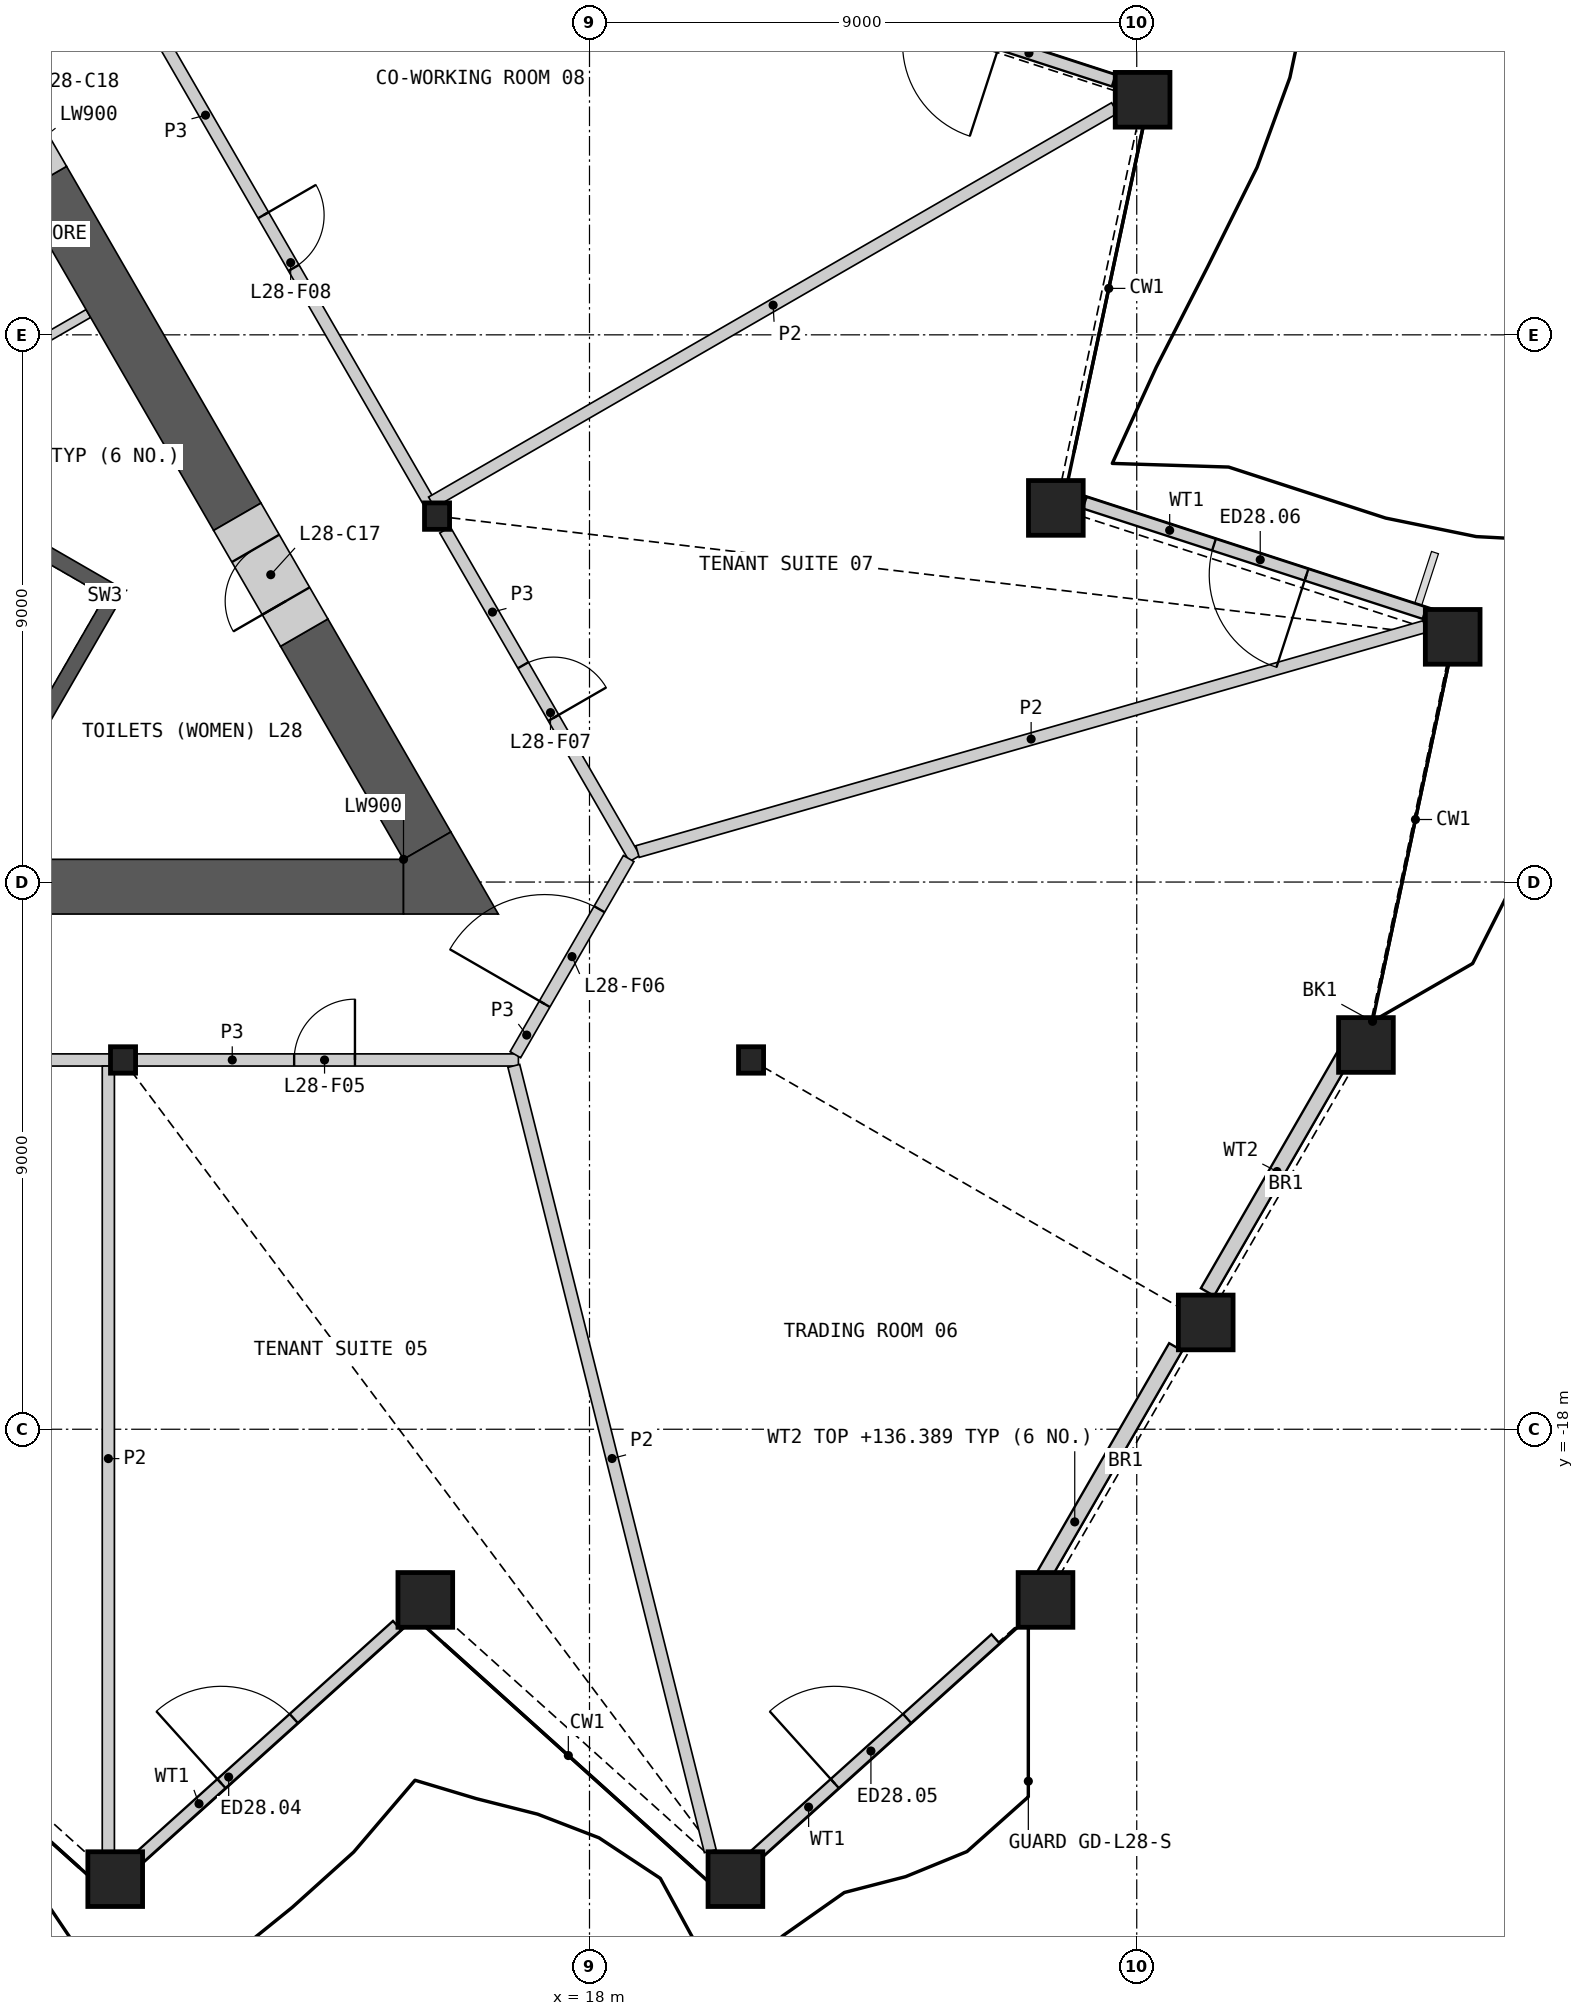
"""IFC4 building model, lengths in metres.
Left out: names, types, materials, properties, quantities, classifications, styles, units other than length and angle.
Written with IfcOpenShell. Run it as: python <this file> out.ifc"""

import sys

from ifc_helpers import new_model, si_unit, direction, frame, frame_2d, origin, origin_2d, place, context, subcontext, project, spatial, polyline, rectangle, hollow_rectangle, i_section, outline, extrude, element, fill, save


model = new_model("IFC4")
c1 = context("Model", 3, precision=1e-05, world=origin(), true_north=direction((0.0, 1.0)))
c2 = subcontext(c1, "Body", "Model", "MODEL_VIEW")
j1 = project(units=[si_unit("LENGTHUNIT", "METRE"), si_unit("PLANEANGLEUNIT", "RADIAN")], contexts=[c1])
p1 = place(None, origin())
s1 = spatial("IfcSite", under=j1, at=p1, CompositionType="ELEMENT")
p2 = place(p1, origin())
s2 = spatial("IfcBuilding", under=s1, at=p2, CompositionType="ELEMENT")
p3 = place(p2, frame((0.0, 0.0, 133.2)))
s3 = spatial("IfcBuildingStorey", under=s2, at=p3, CompositionType="ELEMENT", Elevation=133.2)
for number, where, z_axis, x_axis in (
    (1, (10.2, -25.399, 0.0), (0.0, 0.0, 1.0), (1.0, 0.0, 0.0)),
    (2, (15.3, -20.807, 0.0), (0.0, 0.0, 1.0), (1.0, 0.0, 0.0)),
    (3, (20.4, -25.399, 0.0), (0.0, 0.0, 1.0), (1.0, 0.0, 0.0)),
    (4, (25.5, -20.807, 0.0), (0.0, 0.0, 1.0), (1.0, 0.0, 0.0)),
    (5, (28.135, -16.243, 0.0), (0.0, 0.0, 1.0), (1.0, 0.0, 0.0)),
    (6, (30.769, -11.68, 0.0), (0.0, 0.0, 1.0), (1.0, 0.0, 0.0)),
    (7, (32.196, -4.967, 0.0), (0.0, 0.0, 1.0), (1.0, 0.0, 0.0)),
    (8, (25.669, -2.846, 0.0), (0.0, 0.0, 1.0), (1.0, 0.0, 0.0)),
    (9, (27.096, 3.866, 0.0), (0.0, 0.0, 1.0), (1.0, 0.0, 0.0)),
):
    element("IfcColumn", number, at=place(p3, frame(where, z_axis=z_axis, x_axis=x_axis)), inside=s3, PredefinedType="COLUMN", context=c2, shape_type="SweptSolid", body=[
        extrude(hollow_rectangle(XDim=0.9, YDim=0.9, WallThickness=0.06, at=origin_2d()), origin(), (0.0, 0.0, 1.0), 4.2),
    ])
for number, where, z_axis, x_axis in (
    (10, (10.328, -11.926, 0.0), (0.0, 0.0, 1.0), (1.0, 0.0, 0.0)),
    (11, (20.657, -11.926, 0.0), (0.0, 0.0, 1.0), (1.0, 0.0, 0.0)),
    (12, (15.493, -2.982, 0.0), (0.0, 0.0, 1.0), (1.0, 0.0, 0.0)),
):
    element("IfcColumn", number, at=place(p3, frame(where, z_axis=z_axis, x_axis=x_axis)), inside=s3, PredefinedType="COLUMN", context=c2, shape_type="SweptSolid", body=[
        extrude(i_section(OverallWidth=0.412, OverallDepth=0.435, WebThickness=0.036, FlangeThickness=0.057, at=origin_2d()), origin(), (0.0, 0.0, 1.0), 4.2),
    ])
p4 = place(p3, frame((10.492, -25.137, 0.0), z_axis=(0.0, 0.0, 1.0), x_axis=(0.743136230799, 0.669140151593, 0.0)))
e13 = element("IfcWall", 13, at=p4, inside=s3, PredefinedType="SOLIDWALL", context=c2, shape_type="SweptSolid", body=[
    extrude(rectangle(XDim=5.843, YDim=0.2, at=frame_2d((2.922, 0.0))), origin(), (0.0, 0.0, 1.0), 3.189),
])
p5 = place(p4, frame((1.957, 0.0, 0.0)))
e14 = element("IfcOpeningElement", 14, at=p5, cuts=e13, PredefinedType="OPENING", context=c2, shape_type="SweptSolid", body=[
    extrude(rectangle(XDim=1.6, YDim=2.4, at=frame_2d((0.8, 1.2))), frame((0.0, 0.11, 0.0), z_axis=(0.0, -1.0, 0.0), x_axis=(1.0, 0.0, 0.0)), (0.0, 0.0, 1.0), 0.22),
])
p6 = place(p3, frame((20.579, -25.137, 0.0), z_axis=(0.0, 0.0, 1.0), x_axis=(0.743148838472, 0.66912614945, 0.0)))
e15 = element("IfcWall", 15, at=p6, inside=s3, PredefinedType="SOLIDWALL", context=c2, shape_type="SweptSolid", body=[
    extrude(rectangle(XDim=5.515, YDim=0.2, at=frame_2d((2.757, 0.0))), origin(), (0.0, 0.0, 1.0), 3.189),
])
p7 = place(p6, frame((1.957, 0.0, 0.0)))
e16 = element("IfcOpeningElement", 16, at=p7, cuts=e15, PredefinedType="OPENING", context=c2, shape_type="SweptSolid", body=[
    extrude(rectangle(XDim=1.6, YDim=2.4, at=frame_2d((0.8, 1.2))), frame((0.0, 0.11, 0.0), z_axis=(0.0, -1.0, 0.0), x_axis=(1.0, 0.0, 0.0)), (0.0, 0.0, 1.0), 0.22),
])
p8 = place(p3, frame((25.427, -20.483, 0.0), z_axis=(0.0, 0.0, 1.0), x_axis=(0.499968989506, 0.866043306961, 0.0)))
e17 = element("IfcWall", 17, at=p8, inside=s3, PredefinedType="SOLIDWALL", context=c2, shape_type="SweptSolid", body=[
    extrude(rectangle(XDim=4.429, YDim=0.25, at=frame_2d((2.214, 0.0))), origin(), (0.0, 0.0, 1.0), 3.189),
])
p9 = place(p3, frame((28.163, -15.743, 0.0), z_axis=(0.0, 0.0, 1.0), x_axis=(0.500016357846, 0.866015959371, 0.0)))
e18 = element("IfcWall", 18, at=p9, inside=s3, PredefinedType="SOLIDWALL", context=c2, shape_type="SweptSolid", body=[
    extrude(rectangle(XDim=4.578, YDim=0.25, at=frame_2d((2.289, 0.0))), origin(), (0.0, 0.0, 1.0), 3.189),
])
p10 = place(p3, frame((31.734, -4.577, 0.0), z_axis=(0.0, 0.0, 1.0), x_axis=(-0.951060927669, 0.309003417231, 0.0)))
e19 = element("IfcWall", 19, at=p10, inside=s3, PredefinedType="SOLIDWALL", context=c2, shape_type="SweptSolid", body=[
    extrude(rectangle(XDim=5.877, YDim=0.2, at=frame_2d((2.939, 0.0))), origin(), (0.0, 0.0, 1.0), 3.189),
])
p11 = place(p10, frame((2.042, 0.0, 0.0)))
e20 = element("IfcOpeningElement", 20, at=p11, cuts=e19, PredefinedType="OPENING", context=c2, shape_type="SweptSolid", body=[
    extrude(rectangle(XDim=1.6, YDim=2.4, at=frame_2d((0.8, 1.2))), frame((0.0, 0.11, 0.0), z_axis=(0.0, -1.0, 0.0), x_axis=(1.0, 0.0, 0.0)), (0.0, 0.0, 1.0), 0.22),
])
p12 = place(p3, frame((26.622, 4.181, 0.0), z_axis=(0.0, 0.0, 1.0), x_axis=(-0.951053952554, 0.309024884649, 0.0)))
e21 = element("IfcWall", 21, at=p12, inside=s3, PredefinedType="SOLIDWALL", context=c2, shape_type="SweptSolid", body=[
    extrude(rectangle(XDim=5.865, YDim=0.2, at=frame_2d((2.932, 0.0))), origin(), (0.0, 0.0, 1.0), 3.189),
])
p13 = place(p12, frame((1.969, 0.0, 0.0)))
e22 = element("IfcOpeningElement", 22, at=p13, cuts=e21, PredefinedType="OPENING", context=c2, shape_type="SweptSolid", body=[
    extrude(rectangle(XDim=1.6, YDim=2.4, at=frame_2d((0.8, 1.2))), frame((0.0, 0.11, 0.0), z_axis=(0.0, -1.0, 0.0), x_axis=(1.0, 0.0, 0.0)), (0.0, 0.0, 1.0), 0.22),
])
p14 = place(p3, origin())
e23 = element("IfcWall", 23, at=p14, inside=s3, PredefinedType="SHEAR", context=c2, shape_type="SweptSolid", body=[
    extrude(outline(polyline([(8.83, -6.881), (10.374, -4.206), (10.032, -4.298), (8.738, -6.539), (8.83, -6.881)])), origin(), (0.0, 0.0, 1.0), 3.8),
])
p15 = place(p3, origin())
e24 = element("IfcWall", 24, at=p15, inside=s3, PredefinedType="SHEAR", context=c2, shape_type="SweptSolid", body=[
    extrude(outline(polyline([(10.032, -4.298), (10.374, -4.206), (5.307, -1.281), (5.182, -1.498), (10.032, -4.298)])), origin(), (0.0, 0.0, 1.0), 3.8),
])
p16 = place(p3, frame((8.268, -0.509, 0.0), z_axis=(0.0, 0.0, 1.0), x_axis=(0.866024871741, 0.500000921525, 0.0)))
e25 = element("IfcWall", 25, at=p16, inside=s3, PredefinedType="PARTITIONING", context=c2, shape_type="SweptSolid", body=[
    extrude(rectangle(XDim=1.72, YDim=0.15, at=frame_2d((0.86, 0.0))), origin(), (0.0, 0.0, 1.0), 3.8),
])
p17 = place(p3, frame((3.913, -9.076, 0.0), z_axis=(0.0, 0.0, 1.0), x_axis=(1.0, 0.0, 0.0)))
e26 = element("IfcWall", 26, at=p17, inside=s3, PredefinedType="SHEAR", context=c2, shape_type="SweptSolid", body=[
    extrude(rectangle(XDim=11.029, YDim=0.9, at=frame_2d((5.514, 0.0))), origin(), (0.0, 0.0, 1.0), 3.8),
])
p18 = place(p3, frame((12.208, -2.992, 0.0), z_axis=(0.0, 0.0, 1.0), x_axis=(-0.499990106751, 0.866031115579, 0.0)))
e27 = element("IfcWall", 27, at=p18, inside=s3, PredefinedType="SHEAR", context=c2, shape_type="SweptSolid", body=[
    extrude(rectangle(XDim=6.396, YDim=0.9, at=frame_2d((3.198, 0.0))), origin(), (0.0, 0.0, 1.0), 3.8),
])
p19 = place(p3, frame((15.331, -8.401, 0.0), z_axis=(0.0, 0.0, 1.0), x_axis=(-0.499974938593, 0.866039872511, 0.0)))
e28 = element("IfcWall", 28, at=p19, inside=s3, PredefinedType="SHEAR", context=c2, shape_type="SweptSolid", body=[
    extrude(rectangle(XDim=4.046, YDim=0.9, at=frame_2d((2.023, 0.0))), origin(), (0.0, 0.0, 1.0), 3.8),
])
p20 = place(p3, origin())
e29 = element("IfcWall", 29, at=p20, inside=s3, PredefinedType="SHEAR", context=c2, shape_type="SweptSolid", body=[
    extrude(outline(polyline([(14.941, -8.626), (15.721, -8.176), (16.5, -9.526), (14.941, -9.526), (14.941, -8.626)])), origin(), (0.0, 0.0, 1.0), 3.8),
])
p21 = place(p3, frame((13.308, -4.898, 0.0), z_axis=(0.0, 0.0, 1.0), x_axis=(-0.50002983664, 0.866008176907, 0.0)))
e30 = element("IfcWall", 30, at=p21, inside=s3, PredefinedType="SHEAR", context=c2, shape_type="SweptSolid", body=[
    extrude(rectangle(XDim=2.2, YDim=0.9, at=frame_2d((1.1, 0.0))), origin(), (0.0, 0.0, 1.0), 3.8),
])
p22 = place(p21, frame((0.6, 0.0, 0.0)))
e31 = element("IfcOpeningElement", 31, at=p22, cuts=e30, PredefinedType="OPENING", context=c2, shape_type="SweptSolid", body=[
    extrude(rectangle(XDim=1.0, YDim=2.1, at=frame_2d((0.5, 1.05))), frame((0.0, 0.46, 0.0), z_axis=(0.0, -1.0, 0.0), x_axis=(1.0, 0.0, 0.0)), (0.0, 0.0, 1.0), 0.92),
])
p23 = place(p3, frame((9.01, 2.546, 0.0), z_axis=(0.0, 0.0, 1.0), x_axis=(-0.499994660107, 0.866028486751, 0.0)))
e32 = element("IfcWall", 32, at=p23, inside=s3, PredefinedType="SHEAR", context=c2, shape_type="SweptSolid", body=[
    extrude(rectangle(XDim=2.2, YDim=0.9, at=frame_2d((1.1, 0.0))), origin(), (0.0, 0.0, 1.0), 3.8),
])
p24 = place(p23, frame((0.6, 0.0, 0.0)))
e33 = element("IfcOpeningElement", 33, at=p24, cuts=e32, PredefinedType="OPENING", context=c2, shape_type="SweptSolid", body=[
    extrude(rectangle(XDim=1.0, YDim=2.1, at=frame_2d((0.5, 1.05))), frame((0.0, 0.46, 0.0), z_axis=(0.0, -1.0, 0.0), x_axis=(1.0, 0.0, 0.0)), (0.0, 0.0, 1.0), 0.92),
])
p25 = place(p3, frame((0.227, -11.926, 0.0), z_axis=(0.0, 0.0, 1.0), x_axis=(1.0, 0.0, 0.0)))
e34 = element("IfcWall", 34, at=p25, inside=s3, PredefinedType="PARTITIONING", context=c2, shape_type="SweptSolid", body=[
    extrude(rectangle(XDim=9.969, YDim=0.2, at=frame_2d((4.985, 0.0))), origin(), (0.0, 0.0, 1.0), 3.8),
])
p26 = place(p25, frame((4.384, 0.0, 0.0)))
e35 = element("IfcOpeningElement", 35, at=p26, cuts=e34, PredefinedType="OPENING", context=c2, shape_type="SweptSolid", body=[
    extrude(rectangle(XDim=1.0, YDim=2.1, at=frame_2d((0.5, 1.05))), frame((0.0, 0.11, 0.0), z_axis=(0.0, -1.0, 0.0), x_axis=(1.0, 0.0, 0.0)), (0.0, 0.0, 1.0), 0.22),
])
p27 = place(p3, frame((10.46, 5.736, 0.0), z_axis=(0.0, 0.0, 1.0), x_axis=(0.500004141693, -0.866023012564, 0.0)))
e36 = element("IfcWall", 36, at=p27, inside=s3, PredefinedType="PARTITIONING", context=c2, shape_type="SweptSolid", body=[
    extrude(rectangle(XDim=9.803, YDim=0.2, at=frame_2d((4.902, 0.0))), origin(), (0.0, 0.0, 1.0), 3.8),
])
p28 = place(p27, frame((4.352, 0.0, 0.0)))
e37 = element("IfcOpeningElement", 37, at=p28, cuts=e36, PredefinedType="OPENING", context=c2, shape_type="SweptSolid", body=[
    extrude(rectangle(XDim=1.0, YDim=2.1, at=frame_2d((0.5, 1.05))), frame((0.0, 0.11, 0.0), z_axis=(0.0, -1.0, 0.0), x_axis=(1.0, 0.0, 0.0)), (0.0, 0.0, 1.0), 0.22),
])
p29 = place(p3, frame((10.556, -11.926, 0.0), z_axis=(0.0, 0.0, 1.0), x_axis=(1.0, 0.0, 0.0)))
e38 = element("IfcWall", 38, at=p29, inside=s3, PredefinedType="PARTITIONING", context=c2, shape_type="SweptSolid", body=[
    extrude(rectangle(XDim=6.275, YDim=0.2, at=frame_2d((3.137, 0.0))), origin(), (0.0, 0.0, 1.0), 3.8),
])
p30 = place(p29, frame((2.587, 0.0, 0.0)))
e39 = element("IfcOpeningElement", 39, at=p30, cuts=e38, PredefinedType="OPENING", context=c2, shape_type="SweptSolid", body=[
    extrude(rectangle(XDim=1.0, YDim=2.1, at=frame_2d((0.5, 1.05))), frame((0.0, 0.11, 0.0), z_axis=(0.0, -1.0, 0.0), x_axis=(1.0, 0.0, 0.0)), (0.0, 0.0, 1.0), 0.22),
])
p31 = place(p3, frame((15.624, -3.209, 0.0), z_axis=(0.0, 0.0, 1.0), x_axis=(0.499997920671, -0.866026604282, 0.0)))
e40 = element("IfcWall", 40, at=p31, inside=s3, PredefinedType="PARTITIONING", context=c2, shape_type="SweptSolid", body=[
    extrude(rectangle(XDim=6.24, YDim=0.2, at=frame_2d((3.12, 0.0))), origin(), (0.0, 0.0, 1.0), 3.8),
])
p32 = place(p31, frame((2.57, 0.0, 0.0)))
e41 = element("IfcOpeningElement", 41, at=p32, cuts=e40, PredefinedType="OPENING", context=c2, shape_type="SweptSolid", body=[
    extrude(rectangle(XDim=1.0, YDim=2.1, at=frame_2d((0.5, 1.05))), frame((0.0, 0.11, 0.0), z_axis=(0.0, -1.0, 0.0), x_axis=(1.0, 0.0, 0.0)), (0.0, 0.0, 1.0), 0.22),
])
p33 = place(p3, frame((16.781, -11.84, 0.0), z_axis=(0.0, 0.0, 1.0), x_axis=(0.499958791762, 0.866049194065, 0.0)))
e42 = element("IfcWall", 42, at=p33, inside=s3, PredefinedType="PARTITIONING", context=c2, shape_type="SweptSolid", body=[
    extrude(rectangle(XDim=3.726, YDim=0.2, at=frame_2d((1.863, 0.0))), origin(), (0.0, 0.0, 1.0), 3.8),
])
p34 = place(p33, frame((0.963, 0.0, 0.0)))
e43 = element("IfcOpeningElement", 43, at=p34, cuts=e42, PredefinedType="OPENING", context=c2, shape_type="SweptSolid", body=[
    extrude(rectangle(XDim=1.8, YDim=2.1, at=frame_2d((0.9, 1.05))), frame((0.0, 0.11, 0.0), z_axis=(0.0, -1.0, 0.0), x_axis=(1.0, 0.0, 0.0)), (0.0, 0.0, 1.0), 0.22),
])
p35 = place(p3, frame((18.79, -8.499, 0.0), z_axis=(0.0, 0.0, 1.0), x_axis=(0.961478776026, 0.274879179372, 0.0)))
e44 = element("IfcWall", 44, at=p35, inside=s3, PredefinedType="PARTITIONING", context=c2, shape_type="SweptSolid", body=[
    extrude(rectangle(XDim=13.465, YDim=0.2, at=frame_2d((6.732, 0.0))), origin(), (0.0, 0.0, 1.0), 2.885),
])
p36 = place(p3, frame((16.755, -12.023, 0.0), z_axis=(0.0, 0.0, 1.0), x_axis=(0.242708204495, -0.97009933897, 0.0)))
e45 = element("IfcWall", 45, at=p36, inside=s3, PredefinedType="PARTITIONING", context=c2, shape_type="SweptSolid", body=[
    extrude(rectangle(XDim=13.314, YDim=0.2, at=frame_2d((6.657, 0.0))), origin(), (0.0, 0.0, 1.0), 2.885),
])
p37 = place(p3, frame((10.087, -24.939, 0.0), z_axis=(0.0, 0.0, 1.0), x_axis=(0.0, 1.0, 0.0)))
e46 = element("IfcWall", 46, at=p37, inside=s3, PredefinedType="PARTITIONING", context=c2, shape_type="SweptSolid", body=[
    extrude(rectangle(XDim=12.913, YDim=0.2, at=frame_2d((6.457, 0.0))), origin(), (0.0, 0.0, 1.0), 2.885),
])
p38 = place(p3, frame((15.403, -2.754, 0.0), z_axis=(0.0, 0.0, 1.0), x_axis=(0.866024473704, 0.500001610943, 0.0)))
e47 = element("IfcWall", 47, at=p38, inside=s3, PredefinedType="PARTITIONING", context=c2, shape_type="SweptSolid", body=[
    extrude(rectangle(XDim=12.971, YDim=0.2, at=frame_2d((6.485, 0.0))), origin(), (0.0, 0.0, 1.0), 2.885),
])
p39 = place(p5, origin())
e48 = element("IfcDoor", 48, at=p39, inside=s3, OperationType="DOUBLE_DOOR_SINGLE_SWING", PredefinedType="DOOR", context=c2, shape_type="SweptSolid", body=[
    extrude(rectangle(XDim=1.6, YDim=2.4, at=frame_2d((0.8, 1.2))), frame((0.0, 0.025, 0.0), z_axis=(0.0, -1.0, 0.0), x_axis=(1.0, 0.0, 0.0)), (0.0, 0.0, 1.0), 0.05),
])
fill(e14, e48)
p40 = place(p7, origin())
e49 = element("IfcDoor", 49, at=p40, inside=s3, OperationType="DOUBLE_DOOR_SINGLE_SWING", PredefinedType="DOOR", context=c2, shape_type="SweptSolid", body=[
    extrude(rectangle(XDim=1.6, YDim=2.4, at=frame_2d((0.8, 1.2))), frame((0.0, 0.025, 0.0), z_axis=(0.0, -1.0, 0.0), x_axis=(1.0, 0.0, 0.0)), (0.0, 0.0, 1.0), 0.05),
])
fill(e16, e49)
p41 = place(p11, origin())
e50 = element("IfcDoor", 50, at=p41, inside=s3, OperationType="DOUBLE_DOOR_SINGLE_SWING", PredefinedType="DOOR", context=c2, shape_type="SweptSolid", body=[
    extrude(rectangle(XDim=1.6, YDim=2.4, at=frame_2d((0.8, 1.2))), frame((0.0, 0.025, 0.0), z_axis=(0.0, -1.0, 0.0), x_axis=(1.0, 0.0, 0.0)), (0.0, 0.0, 1.0), 0.05),
])
fill(e20, e50)
p42 = place(p22, origin())
e51 = element("IfcDoor", 51, at=p42, inside=s3, OperationType="SINGLE_SWING_LEFT", PredefinedType="DOOR", context=c2, shape_type="SweptSolid", body=[
    extrude(rectangle(XDim=1.0, YDim=2.1, at=frame_2d((0.5, 1.05))), frame((0.0, 0.205, 0.0), z_axis=(0.0, -1.0, 0.0), x_axis=(1.0, 0.0, 0.0)), (0.0, 0.0, 1.0), 0.05),
])
fill(e31, e51)
p43 = place(p30, origin())
e52 = element("IfcDoor", 52, at=p43, inside=s3, OperationType="SINGLE_SWING_RIGHT", PredefinedType="DOOR", context=c2, shape_type="SweptSolid", body=[
    extrude(rectangle(XDim=1.0, YDim=2.1, at=frame_2d((0.5, 1.05))), frame((0.0, 0.025, 0.0), z_axis=(0.0, -1.0, 0.0), x_axis=(1.0, 0.0, 0.0)), (0.0, 0.0, 1.0), 0.05),
])
fill(e39, e52)
p44 = place(p34, origin())
e53 = element("IfcDoor", 53, at=p44, inside=s3, OperationType="DOUBLE_DOOR_SINGLE_SWING", PredefinedType="DOOR", context=c2, shape_type="SweptSolid", body=[
    extrude(rectangle(XDim=1.8, YDim=2.1, at=frame_2d((0.9, 1.05))), frame((0.0, 0.025, 0.0), z_axis=(0.0, -1.0, 0.0), x_axis=(1.0, 0.0, 0.0)), (0.0, 0.0, 1.0), 0.05),
])
fill(e43, e53)
p45 = place(p32, origin())
e54 = element("IfcDoor", 54, at=p45, inside=s3, OperationType="SINGLE_SWING_RIGHT", PredefinedType="DOOR", context=c2, shape_type="SweptSolid", body=[
    extrude(rectangle(XDim=1.0, YDim=2.1, at=frame_2d((0.5, 1.05))), frame((0.0, 0.025, 0.0), z_axis=(0.0, -1.0, 0.0), x_axis=(1.0, 0.0, 0.0)), (0.0, 0.0, 1.0), 0.05),
])
fill(e41, e54)
p46 = place(p28, origin())
e55 = element("IfcDoor", 55, at=p46, inside=s3, OperationType="SINGLE_SWING_LEFT", PredefinedType="DOOR", context=c2, shape_type="SweptSolid", body=[
    extrude(rectangle(XDim=1.0, YDim=2.1, at=frame_2d((0.5, 1.05))), frame((0.0, 0.025, 0.0), z_axis=(0.0, -1.0, 0.0), x_axis=(1.0, 0.0, 0.0)), (0.0, 0.0, 1.0), 0.05),
])
fill(e37, e55)
save(model, sys.argv[1])
